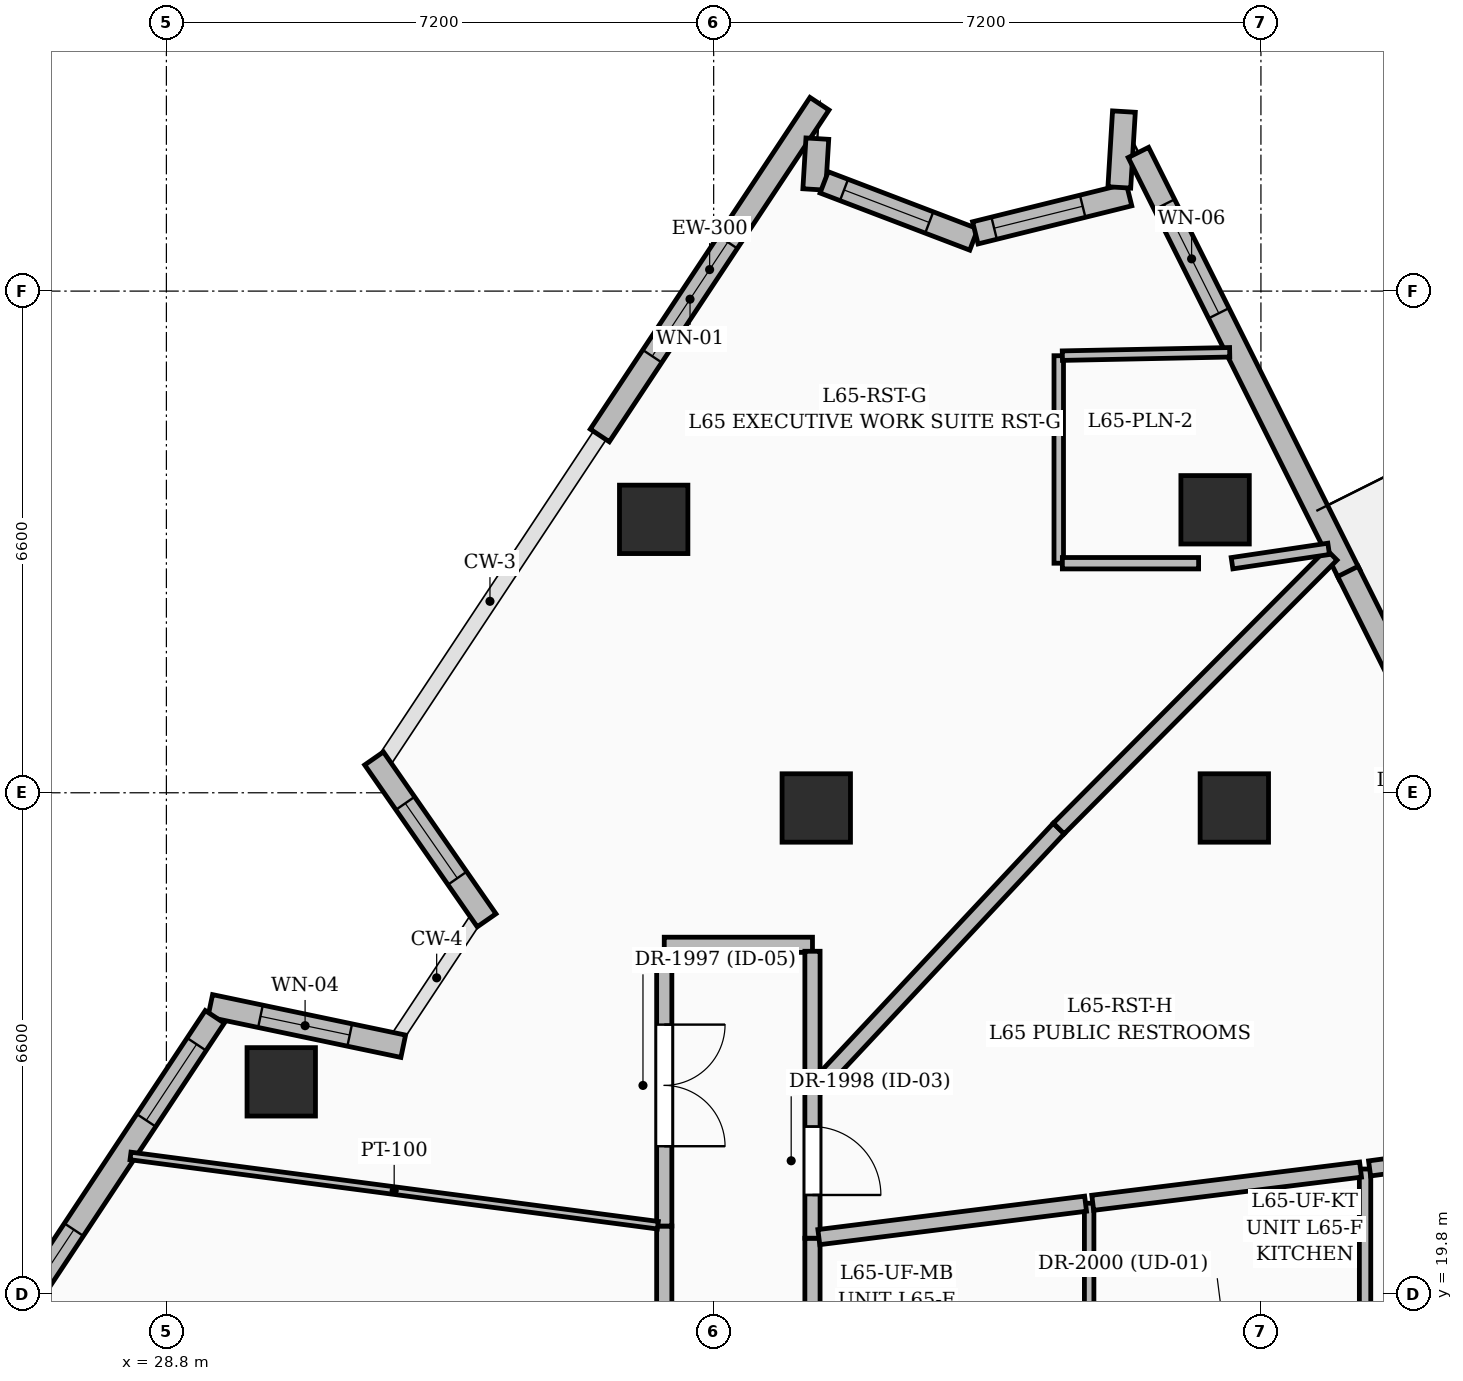
"""IFC4 building model, lengths in metres.
Left out: names, types, materials, properties, quantities, classifications, styles, units other than length and angle.
Written with IfcOpenShell. Run it as: python <this file> out.ifc"""

import sys

from ifc_helpers import new_model, si_unit, direction, frame, frame_2d, origin, origin_2d, place, context, subcontext, project, spatial, rectangle, extrude, element, fill, save


model = new_model("IFC4")
c1 = context("Model", 3, precision=1e-05, world=origin(), true_north=direction((0.0, 1.0)))
c2 = subcontext(c1, "Body", "Model", "MODEL_VIEW")
j1 = project(units=[si_unit("LENGTHUNIT", "METRE"), si_unit("PLANEANGLEUNIT", "RADIAN")], contexts=[c1])
p1 = place(None, origin())
s1 = spatial("IfcSite", under=j1, at=p1, CompositionType="ELEMENT")
p2 = place(p1, origin())
s2 = spatial("IfcBuilding", under=s1, at=p2, CompositionType="ELEMENT")
p3 = place(p2, frame((0.0, 0.0, 252.0)))
s3 = spatial("IfcBuildingStorey", under=s2, at=p3, CompositionType="ELEMENT", Elevation=252.0)
for number, where, z_axis, x_axis in (
    (1, (42.85, 26.2, 0.0), (0.0, 0.0, 1.0), (1.0, 0.0, 0.0)),
    (2, (37.35, 26.2, 0.0), (0.0, 0.0, 1.0), (1.0, 0.0, 0.0)),
    (3, (42.597, 30.123, 0.0), (0.0, 0.0, 1.0), (1.0, 0.0, 0.0)),
    (4, (35.211, 29.997, 0.0), (0.0, 0.0, 1.0), (1.0, 0.0, 0.0)),
    (5, (30.311, 22.597, 0.0), (0.0, 0.0, 1.0), (1.0, 0.0, 0.0)),
):
    element("IfcColumn", number, at=place(p3, frame(where, z_axis=z_axis, x_axis=x_axis)), inside=s3, PredefinedType="COLUMN", context=c2, shape_type="SweptSolid", body=[
        extrude(rectangle(XDim=0.9, YDim=0.9, at=origin_2d()), origin(), (0.0, 0.0, 1.0), 3.75),
    ])
p4 = place(p3, frame((29.377, 23.598, 0.0), z_axis=(0.0, 0.0, 1.0), x_axis=(0.978710242367, -0.205246830635, 0.0)))
e6 = element("IfcWall", 6, at=p4, inside=s3, PredefinedType="SOLIDWALL", context=c2, shape_type="SweptSolid", body=[
    extrude(rectangle(XDim=2.594, YDim=0.3, at=frame_2d((1.297, 0.0))), origin(), (0.0, 0.0, 1.0), 2.825),
])
p5 = place(p4, frame((0.675, 0.0, 0.8)))
e7 = element("IfcOpeningElement", 7, at=p5, cuts=e6, PredefinedType="OPENING", context=c2, shape_type="SweptSolid", body=[
    extrude(rectangle(XDim=1.2, YDim=1.8, at=frame_2d((0.6, 0.9))), frame((0.0, 0.16, 0.0), z_axis=(0.0, -1.0, 0.0), x_axis=(1.0, 0.0, 0.0)), (0.0, 0.0, 1.0), 0.32),
])
p6 = place(p3, frame((33.013, 24.722, 0.0), z_axis=(0.0, 0.0, 1.0), x_axis=(-0.570926598626, 0.821001107783, 0.0)))
e8 = element("IfcWall", 8, at=p6, inside=s3, PredefinedType="SOLIDWALL", context=c2, shape_type="SweptSolid", body=[
    extrude(rectangle(XDim=2.594, YDim=0.3, at=frame_2d((1.297, 0.0))), origin(), (0.0, 0.0, 1.0), 2.825),
])
p7 = place(p6, frame((0.675, 0.0, 0.8)))
e9 = element("IfcOpeningElement", 9, at=p7, cuts=e8, PredefinedType="OPENING", context=c2, shape_type="SweptSolid", body=[
    extrude(rectangle(XDim=1.2, YDim=1.8, at=frame_2d((0.6, 0.9))), frame((0.0, 0.16, 0.0), z_axis=(0.0, -1.0, 0.0), x_axis=(1.0, 0.0, 0.0)), (0.0, 0.0, 1.0), 0.32),
])
p8 = place(p3, frame((34.502, 31.101, 0.0), z_axis=(0.0, 0.0, 1.0), x_axis=(0.552157372899, 0.833739908816, 0.0)))
e10 = element("IfcWall", 10, at=p8, inside=s3, PredefinedType="SOLIDWALL", context=c2, shape_type="SweptSolid", body=[
    extrude(rectangle(XDim=5.234, YDim=0.3, at=frame_2d((2.617, 0.0))), origin(), (0.0, 0.0, 1.0), 3.5),
])
p9 = place(p8, frame((1.25, 0.0, 0.6)))
e11 = element("IfcOpeningElement", 11, at=p9, cuts=e10, PredefinedType="OPENING", context=c2, shape_type="SweptSolid", body=[
    extrude(rectangle(XDim=1.8, YDim=2.1, at=frame_2d((0.9, 1.05))), frame((0.0, 0.16, 0.0), z_axis=(0.0, -1.0, 0.0), x_axis=(1.0, 0.0, 0.0)), (0.0, 0.0, 1.0), 0.32),
])
p10 = place(p3, frame((37.364, 35.006, 0.0), z_axis=(0.0, 0.0, 1.0), x_axis=(-0.060517074116, -0.998167162223, 0.0)))
e12 = element("IfcWall", 12, at=p10, inside=s3, PredefinedType="SOLIDWALL", context=c2, shape_type="SweptSolid", body=[
    extrude(rectangle(XDim=0.67, YDim=0.3, at=frame_2d((0.335, 0.0))), origin(), (0.0, 0.0, 1.0), 3.5),
])
p11 = place(p3, frame((37.454, 34.431, 0.0), z_axis=(0.0, 0.0, 1.0), x_axis=(0.934285742141, -0.356525107155, 0.0)))
e13 = element("IfcWall", 13, at=p11, inside=s3, PredefinedType="SOLIDWALL", context=c2, shape_type="SweptSolid", body=[
    extrude(rectangle(XDim=2.108, YDim=0.3, at=frame_2d((1.054, 0.0))), origin(), (0.0, 0.0, 1.0), 3.5),
])
p12 = place(p11, frame((0.28, 0.0, 0.8)))
e14 = element("IfcOpeningElement", 14, at=p12, cuts=e13, PredefinedType="OPENING", context=c2, shape_type="SweptSolid", body=[
    extrude(rectangle(XDim=1.2, YDim=1.8, at=frame_2d((0.6, 0.9))), frame((0.0, 0.16, 0.0), z_axis=(0.0, -1.0, 0.0), x_axis=(1.0, 0.0, 0.0)), (0.0, 0.0, 1.0), 0.32),
])
p13 = place(p3, frame((39.442, 33.766, 0.0), z_axis=(0.0, 0.0, 1.0), x_axis=(0.970636719037, 0.240550118805, 0.0)))
e15 = element("IfcWall", 15, at=p13, inside=s3, PredefinedType="SOLIDWALL", context=c2, shape_type="SweptSolid", body=[
    extrude(rectangle(XDim=2.084, YDim=0.3, at=frame_2d((1.042, 0.0))), origin(), (0.0, 0.0, 1.0), 3.5),
])
p14 = place(p13, frame((0.255, 0.0, 0.8)))
e16 = element("IfcOpeningElement", 16, at=p14, cuts=e15, PredefinedType="OPENING", context=c2, shape_type="SweptSolid", body=[
    extrude(rectangle(XDim=1.2, YDim=1.8, at=frame_2d((0.6, 0.9))), frame((0.0, 0.16, 0.0), z_axis=(0.0, -1.0, 0.0), x_axis=(1.0, 0.0, 0.0)), (0.0, 0.0, 1.0), 0.32),
])
p15 = place(p3, frame((41.337, 34.364, 0.0), z_axis=(0.0, 0.0, 1.0), x_axis=(0.060554036278, 0.998164920587, 0.0)))
e17 = element("IfcWall", 17, at=p15, inside=s3, PredefinedType="SOLIDWALL", context=c2, shape_type="SweptSolid", body=[
    extrude(rectangle(XDim=1.0, YDim=0.3, at=frame_2d((0.5, 0.0))), origin(), (0.0, 0.0, 1.0), 3.5),
])
p16 = place(p3, frame((41.588, 34.824, 0.0), z_axis=(0.0, 0.0, 1.0), x_axis=(0.447245016671, -0.894411479725, 0.0)))
e18 = element("IfcWall", 18, at=p16, inside=s3, PredefinedType="SOLIDWALL", context=c2, shape_type="SweptSolid", body=[
    extrude(rectangle(XDim=6.216, YDim=0.3, at=frame_2d((3.108, 0.0))), origin(), (0.0, 0.0, 1.0), 3.5),
])
p17 = place(p16, frame((0.765, 0.0, 0.55)))
e19 = element("IfcOpeningElement", 19, at=p17, cuts=e18, PredefinedType="OPENING", context=c2, shape_type="SweptSolid", body=[
    extrude(rectangle(XDim=1.6, YDim=2.2, at=frame_2d((0.8, 1.1))), frame((0.0, 0.16, 0.0), z_axis=(0.0, -1.0, 0.0), x_axis=(1.0, 0.0, 0.0)), (0.0, 0.0, 1.0), 0.32),
])
p18 = place(p3, frame((44.344, 29.312, 0.0), z_axis=(0.0, 0.0, 1.0), x_axis=(0.44722784404, -0.894420066588, 0.0)))
e20 = element("IfcWall", 20, at=p18, inside=s3, PredefinedType="SOLIDWALL", context=c2, shape_type="SweptSolid", body=[
    extrude(rectangle(XDim=6.854, YDim=0.3, at=frame_2d((3.427, 0.0))), origin(), (0.0, 0.0, 1.0), 3.5),
])
p19 = place(p18, frame((1.345, 0.0, 0.0)))
e21 = element("IfcOpeningElement", 21, at=p19, cuts=e20, PredefinedType="OPENING", context=c2, shape_type="SweptSolid", body=[
    extrude(rectangle(XDim=1.0, YDim=2.2, at=frame_2d((0.5, 1.1))), frame((0.0, 0.16, 0.0), z_axis=(0.0, -1.0, 0.0), x_axis=(1.0, 0.0, 0.0)), (0.0, 0.0, 1.0), 0.32),
])
p20 = place(p3, frame((25.471, 17.463, 0.0), z_axis=(0.0, 0.0, 1.0), x_axis=(0.55208552879, 0.833787484255, 0.0)))
e22 = element("IfcWall", 22, at=p20, inside=s3, PredefinedType="SOLIDWALL", context=c2, shape_type="SweptSolid", body=[
    extrude(rectangle(XDim=7.183, YDim=0.3, at=frame_2d((3.591, 0.0))), origin(), (0.0, 0.0, 1.0), 3.5),
])
p21 = place(p20, frame((1.725, 0.0, 0.55)))
e23 = element("IfcOpeningElement", 23, at=p21, cuts=e22, PredefinedType="OPENING", context=c2, shape_type="SweptSolid", body=[
    extrude(rectangle(XDim=2.1, YDim=2.4, at=frame_2d((1.05, 1.2))), frame((0.0, 0.16, 0.0), z_axis=(0.0, -1.0, 0.0), x_axis=(1.0, 0.0, 0.0)), (0.0, 0.0, 1.0), 0.32),
])
p22 = place(p20, frame((5.55, 0.0, 0.8)))
e24 = element("IfcOpeningElement", 24, at=p22, cuts=e22, PredefinedType="OPENING", context=c2, shape_type="SweptSolid", body=[
    extrude(rectangle(XDim=1.2, YDim=1.8, at=frame_2d((0.6, 0.9))), frame((0.0, 0.16, 0.0), z_axis=(0.0, -1.0, 0.0), x_axis=(1.0, 0.0, 0.0)), (0.0, 0.0, 1.0), 0.32),
])
p23 = place(p3, frame((35.35, 20.7, 0.0), z_axis=(0.0, 0.0, 1.0), x_axis=(0.0, -1.0, 0.0)))
e25 = element("IfcWall", 25, at=p23, inside=s3, PredefinedType="PARTITIONING", context=c2, shape_type="SweptSolid", body=[
    extrude(rectangle(XDim=3.35, YDim=0.2, at=frame_2d((1.675, 0.0))), origin(), (0.0, 0.0, 1.0), 3.003),
])
p24 = place(p3, frame((37.3, 17.435, 0.0), z_axis=(0.0, 0.0, 1.0), x_axis=(0.0, 1.0, 0.0)))
e26 = element("IfcWall", 26, at=p24, inside=s3, PredefinedType="PARTITIONING", context=c2, shape_type="SweptSolid", body=[
    extrude(rectangle(XDim=3.105, YDim=0.2, at=frame_2d((1.552, 0.0))), origin(), (0.0, 0.0, 1.0), 3.003),
])
p25 = place(p3, frame((37.3, 24.4, 0.0), z_axis=(0.0, 0.0, 1.0), x_axis=(-1.0, 0.0, 0.0)))
e27 = element("IfcWall", 27, at=p25, inside=s3, PredefinedType="PARTITIONING", context=c2, shape_type="SweptSolid", body=[
    extrude(rectangle(XDim=1.95, YDim=0.2, at=frame_2d((0.975, 0.0))), origin(), (0.0, 0.0, 1.0), 2.685),
])
p26 = place(p3, frame((35.35, 24.315, 0.0), z_axis=(0.0, 0.0, 1.0), x_axis=(0.0, -1.0, 0.0)))
e28 = element("IfcWall", 28, at=p26, inside=s3, PredefinedType="PARTITIONING", context=c2, shape_type="SweptSolid", body=[
    extrude(rectangle(XDim=3.615, YDim=0.2, at=frame_2d((1.808, 0.0))), origin(), (0.0, 0.0, 1.0), 2.685),
])
p27 = place(p26, frame((0.965, 0.0, 0.0)))
e29 = element("IfcOpeningElement", 29, at=p27, cuts=e28, PredefinedType="OPENING", context=c2, shape_type="SweptSolid", body=[
    extrude(rectangle(XDim=1.6, YDim=2.3, at=frame_2d((0.8, 1.15))), frame((0.0, 0.11, 0.0), z_axis=(0.0, -1.0, 0.0), x_axis=(1.0, 0.0, 0.0)), (0.0, 0.0, 1.0), 0.22),
])
p28 = place(p3, frame((37.3, 22.47, 0.0), z_axis=(0.0, 0.0, 1.0), x_axis=(0.0, -1.0, 0.0)))
e30 = element("IfcWall", 30, at=p28, inside=s3, PredefinedType="PARTITIONING", context=c2, shape_type="SweptSolid", body=[
    extrude(rectangle(XDim=1.93, YDim=0.2, at=frame_2d((0.965, 0.0))), origin(), (0.0, 0.0, 1.0), 3.5),
])
p29 = place(p28, frame((0.461, 0.0, 0.0)))
e31 = element("IfcOpeningElement", 31, at=p29, cuts=e30, PredefinedType="OPENING", context=c2, shape_type="SweptSolid", body=[
    extrude(rectangle(XDim=0.9, YDim=2.1, at=frame_2d((0.45, 1.05))), frame((0.0, 0.11, 0.0), z_axis=(0.0, -1.0, 0.0), x_axis=(1.0, 0.0, 0.0)), (0.0, 0.0, 1.0), 0.22),
])
p30 = place(p3, frame((37.3, 22.645, 0.0), z_axis=(0.0, 0.0, 1.0), x_axis=(0.0, 1.0, 0.0)))
e32 = element("IfcWall", 32, at=p30, inside=s3, PredefinedType="PARTITIONING", context=c2, shape_type="SweptSolid", body=[
    extrude(rectangle(XDim=1.67, YDim=0.2, at=frame_2d((0.835, 0.0))), origin(), (0.0, 0.0, 1.0), 3.5),
])
p31 = place(p3, frame((35.266, 20.711, 0.0), z_axis=(0.0, 0.0, 1.0), x_axis=(-0.991486211261, 0.130211723279, 0.0)))
e33 = element("IfcWall", 33, at=p31, inside=s3, PredefinedType="PARTITIONING", context=c2, shape_type="SweptSolid", body=[
    extrude(rectangle(XDim=6.997, YDim=0.1, at=frame_2d((3.499, 0.0))), origin(), (0.0, 0.0, 1.0), 2.685),
])
p32 = place(p3, frame((44.57, 21.45, 0.0), z_axis=(0.0, 0.0, 1.0), x_axis=(0.0, -1.0, 0.0)))
e34 = element("IfcWall", 34, at=p32, inside=s3, PredefinedType="PARTITIONING", context=c2, shape_type="SweptSolid", body=[
    extrude(rectangle(XDim=2.19, YDim=0.15, at=frame_2d((1.095, 0.0))), origin(), (0.0, 0.0, 1.0), 2.685),
])
p33 = place(p3, frame((47.943, 21.906, 0.0), z_axis=(0.0, 0.0, 1.0), x_axis=(-0.99097487628, -0.134047732473, 0.0)))
e35 = element("IfcWall", 35, at=p33, inside=s3, PredefinedType="PARTITIONING", context=c2, shape_type="SweptSolid", body=[
    extrude(rectangle(XDim=3.344, YDim=0.2, at=frame_2d((1.672, 0.0))), origin(), (0.0, 0.0, 1.0), 2.685),
])
p34 = place(p3, frame((40.94, 21.0, 0.0), z_axis=(0.0, 0.0, 1.0), x_axis=(0.0, -1.0, 0.0)))
e36 = element("IfcWall", 36, at=p34, inside=s3, PredefinedType="PARTITIONING", context=c2, shape_type="SweptSolid", body=[
    extrude(rectangle(XDim=1.752, YDim=0.125, at=frame_2d((0.876, 0.0))), origin(), (0.0, 0.0, 1.0), 3.003),
])
p35 = place(p3, frame((44.51, 21.443, 0.0), z_axis=(0.0, 0.0, 1.0), x_axis=(-0.992404306197, -0.123019075928, 0.0)))
e37 = element("IfcWall", 37, at=p35, inside=s3, PredefinedType="PARTITIONING", context=c2, shape_type="SweptSolid", body=[
    extrude(rectangle(XDim=3.55, YDim=0.2, at=frame_2d((1.775, 0.0))), origin(), (0.0, 0.0, 1.0), 2.685),
])
p36 = place(p3, frame((40.893, 20.994, 0.0), z_axis=(0.0, 0.0, 1.0), x_axis=(-0.99223214051, -0.124400077729, 0.0)))
e38 = element("IfcWall", 38, at=p36, inside=s3, PredefinedType="PARTITIONING", context=c2, shape_type="SweptSolid", body=[
    extrude(rectangle(XDim=3.537, YDim=0.2, at=frame_2d((1.768, 0.0))), origin(), (0.0, 0.0, 1.0), 3.5),
])
p37 = place(p3, frame((40.54, 25.93, 0.0), z_axis=(0.0, 0.0, 1.0), x_axis=(-0.683518835616, -0.729932874557, 0.0)))
e39 = element("IfcWall", 39, at=p37, inside=s3, PredefinedType="PARTITIONING", context=c2, shape_type="SweptSolid", body=[
    extrude(rectangle(XDim=4.655, YDim=0.2, at=frame_2d((2.328, 0.0))), origin(), (0.0, 0.0, 1.0), 3.5),
])
p38 = place(p3, frame((44.13, 29.532, 0.0), z_axis=(0.0, 0.0, 1.0), x_axis=(-0.705905569531, -0.708305955717, 0.0)))
e40 = element("IfcWall", 40, at=p38, inside=s3, PredefinedType="PARTITIONING", context=c2, shape_type="SweptSolid", body=[
    extrude(rectangle(XDim=5.085, YDim=0.2, at=frame_2d((2.543, 0.0))), origin(), (0.0, 0.0, 1.0), 2.685),
])
p39 = place(p3, frame((40.54, 29.42, 0.0), z_axis=(0.0, 0.0, 1.0), x_axis=(0.0, 1.0, 0.0)))
e41 = element("IfcWall", 41, at=p39, inside=s3, PredefinedType="PARTITIONING", context=c2, shape_type="SweptSolid", body=[
    extrude(rectangle(XDim=2.73, YDim=0.125, at=frame_2d((1.365, 0.0))), origin(), (0.0, 0.0, 1.0), 2.82),
])
p40 = place(p3, frame((42.38, 29.42, 0.0), z_axis=(0.0, 0.0, 1.0), x_axis=(-1.0, 0.0, 0.0)))
e42 = element("IfcWall", 42, at=p40, inside=s3, PredefinedType="PARTITIONING", context=c2, shape_type="SweptSolid", body=[
    extrude(rectangle(XDim=1.792, YDim=0.15, at=frame_2d((0.896, 0.0))), origin(), (0.0, 0.0, 1.0), 3.5),
])
p41 = place(p3, frame((44.091, 29.609, 0.0), z_axis=(0.0, 0.0, 1.0), x_axis=(-0.989127842111, -0.147058192431, 0.0)))
e43 = element("IfcWall", 43, at=p41, inside=s3, PredefinedType="PARTITIONING", context=c2, shape_type="SweptSolid", body=[
    extrude(rectangle(XDim=1.285, YDim=0.15, at=frame_2d((0.643, 0.0))), origin(), (0.0, 0.0, 1.0), 2.82),
])
p42 = place(p3, frame((42.789, 32.195, 0.0), z_axis=(0.0, 0.0, 1.0), x_axis=(-0.999798638934, -0.020066927661, 0.0)))
e44 = element("IfcWall", 44, at=p42, inside=s3, PredefinedType="PARTITIONING", context=c2, shape_type="SweptSolid", body=[
    extrude(rectangle(XDim=2.202, YDim=0.125, at=frame_2d((1.101, 0.0))), origin(), (0.0, 0.0, 1.0), 3.5),
])
p43 = place(p5, origin())
e45 = element("IfcWindow", 45, at=p43, inside=s3, PartitioningType="SINGLE_PANEL", PredefinedType="WINDOW", context=c2, shape_type="SweptSolid", body=[
    extrude(rectangle(XDim=1.2, YDim=1.8, at=frame_2d((0.6, 0.9))), frame((0.0, 0.03, 0.0), z_axis=(0.0, -1.0, 0.0), x_axis=(1.0, 0.0, 0.0)), (0.0, 0.0, 1.0), 0.06),
])
fill(e7, e45)
p44 = place(p7, origin())
e46 = element("IfcWindow", 46, at=p44, inside=s3, PartitioningType="SINGLE_PANEL", PredefinedType="WINDOW", context=c2, shape_type="SweptSolid", body=[
    extrude(rectangle(XDim=1.2, YDim=1.8, at=frame_2d((0.6, 0.9))), frame((0.0, 0.03, 0.0), z_axis=(0.0, -1.0, 0.0), x_axis=(1.0, 0.0, 0.0)), (0.0, 0.0, 1.0), 0.06),
])
fill(e9, e46)
p45 = place(p9, origin())
e47 = element("IfcWindow", 47, at=p45, inside=s3, PartitioningType="SINGLE_PANEL", PredefinedType="WINDOW", context=c2, shape_type="SweptSolid", body=[
    extrude(rectangle(XDim=1.8, YDim=2.1, at=frame_2d((0.9, 1.05))), frame((0.0, 0.03, 0.0), z_axis=(0.0, -1.0, 0.0), x_axis=(1.0, 0.0, 0.0)), (0.0, 0.0, 1.0), 0.06),
])
fill(e11, e47)
p46 = place(p12, origin())
e48 = element("IfcWindow", 48, at=p46, inside=s3, PartitioningType="SINGLE_PANEL", PredefinedType="WINDOW", context=c2, shape_type="SweptSolid", body=[
    extrude(rectangle(XDim=1.2, YDim=1.8, at=frame_2d((0.6, 0.9))), frame((0.0, 0.03, 0.0), z_axis=(0.0, -1.0, 0.0), x_axis=(1.0, 0.0, 0.0)), (0.0, 0.0, 1.0), 0.06),
])
fill(e14, e48)
p47 = place(p14, origin())
e49 = element("IfcWindow", 49, at=p47, inside=s3, PartitioningType="SINGLE_PANEL", PredefinedType="WINDOW", context=c2, shape_type="SweptSolid", body=[
    extrude(rectangle(XDim=1.2, YDim=1.8, at=frame_2d((0.6, 0.9))), frame((0.0, 0.03, 0.0), z_axis=(0.0, -1.0, 0.0), x_axis=(1.0, 0.0, 0.0)), (0.0, 0.0, 1.0), 0.06),
])
fill(e16, e49)
p48 = place(p17, origin())
e50 = element("IfcWindow", 50, at=p48, inside=s3, PartitioningType="SINGLE_PANEL", PredefinedType="WINDOW", context=c2, shape_type="SweptSolid", body=[
    extrude(rectangle(XDim=1.6, YDim=2.2, at=frame_2d((0.8, 1.1))), frame((0.0, 0.03, 0.0), z_axis=(0.0, -1.0, 0.0), x_axis=(1.0, 0.0, 0.0)), (0.0, 0.0, 1.0), 0.06),
])
fill(e19, e50)
p49 = place(p21, origin())
e51 = element("IfcWindow", 51, at=p49, inside=s3, PartitioningType="SINGLE_PANEL", PredefinedType="WINDOW", context=c2, shape_type="SweptSolid", body=[
    extrude(rectangle(XDim=2.1, YDim=2.4, at=frame_2d((1.05, 1.2))), frame((0.0, 0.03, 0.0), z_axis=(0.0, -1.0, 0.0), x_axis=(1.0, 0.0, 0.0)), (0.0, 0.0, 1.0), 0.06),
])
fill(e23, e51)
p50 = place(p22, origin())
e52 = element("IfcWindow", 52, at=p50, inside=s3, PartitioningType="SINGLE_PANEL", PredefinedType="WINDOW", context=c2, shape_type="SweptSolid", body=[
    extrude(rectangle(XDim=1.2, YDim=1.8, at=frame_2d((0.6, 0.9))), frame((0.0, 0.03, 0.0), z_axis=(0.0, -1.0, 0.0), x_axis=(1.0, 0.0, 0.0)), (0.0, 0.0, 1.0), 0.06),
])
fill(e24, e52)
p51 = place(p27, origin())
e53 = element("IfcDoor", 53, at=p51, inside=s3, OperationType="DOUBLE_DOOR_SINGLE_SWING", PredefinedType="DOOR", context=c2, shape_type="SweptSolid", body=[
    extrude(rectangle(XDim=1.6, YDim=2.3, at=frame_2d((0.8, 1.15))), frame((0.0, 0.025, 0.0), z_axis=(0.0, -1.0, 0.0), x_axis=(1.0, 0.0, 0.0)), (0.0, 0.0, 1.0), 0.05),
])
fill(e29, e53)
p52 = place(p29, origin())
e54 = element("IfcDoor", 54, at=p52, inside=s3, OperationType="SINGLE_SWING_RIGHT", PredefinedType="DOOR", context=c2, shape_type="SweptSolid", body=[
    extrude(rectangle(XDim=0.9, YDim=2.1, at=frame_2d((0.45, 1.05))), frame((0.0, 0.025, 0.0), z_axis=(0.0, -1.0, 0.0), x_axis=(1.0, 0.0, 0.0)), (0.0, 0.0, 1.0), 0.05),
])
fill(e31, e54)
save(model, sys.argv[1])
